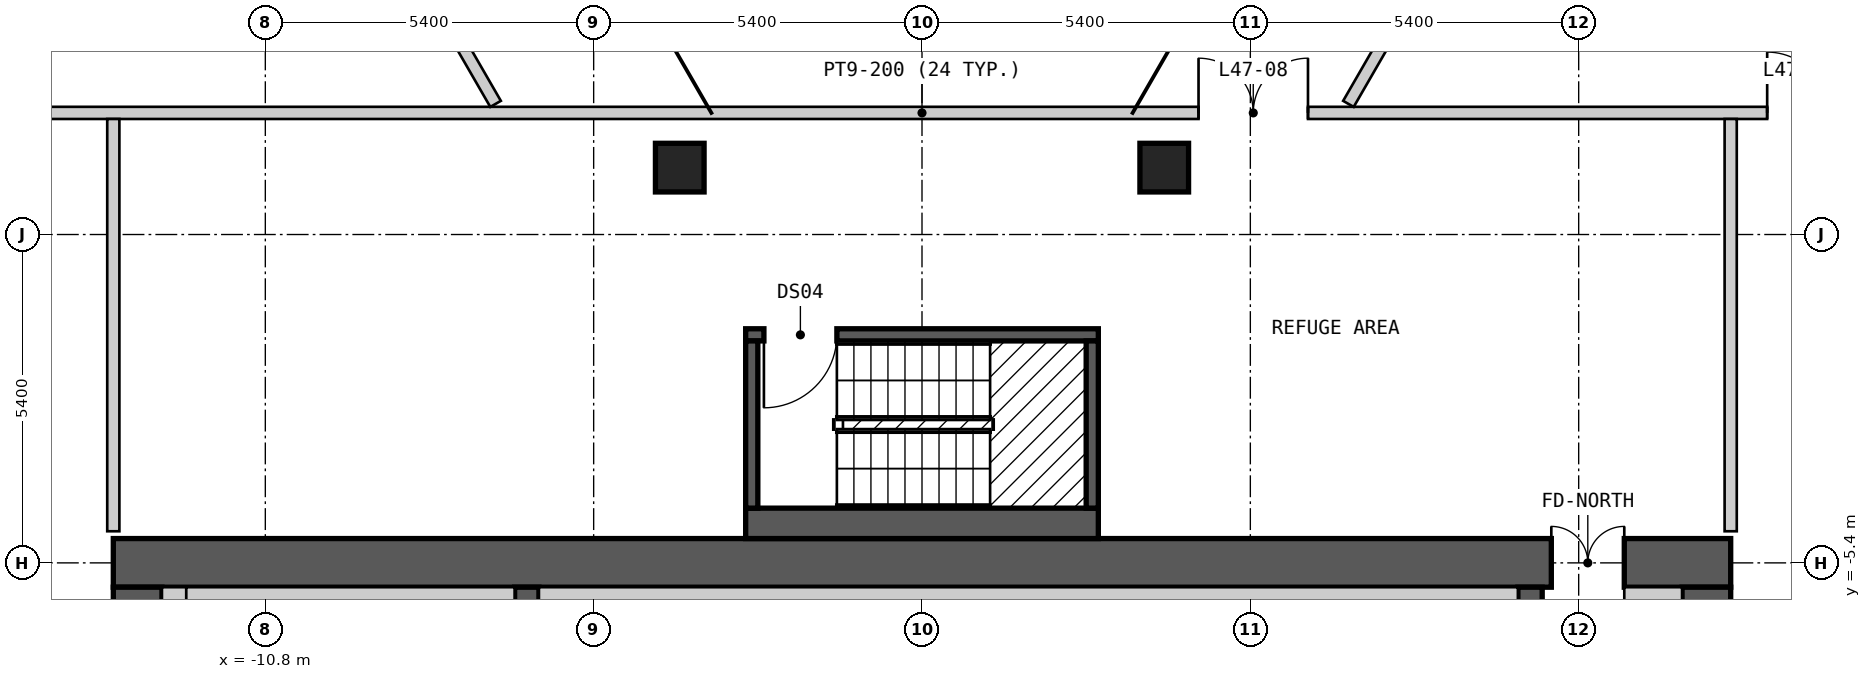
"""IFC4 building model, lengths in metres.
Left out: names, types, materials, properties, quantities, classifications, styles, units other than length and angle.
Written with IfcOpenShell. Run it as: python <this file> out.ifc"""

import sys

from ifc_helpers import new_model, si_unit, direction, frame, frame_2d, origin, origin_2d, place, context, subcontext, project, spatial, rectangle, extrude, element, fill, save


model = new_model("IFC4")
c1 = context("Model", 3, precision=1e-05, world=origin(), true_north=direction((0.0, 1.0)))
c2 = subcontext(c1, "Body", "Model", "MODEL_VIEW")
j1 = project(units=[si_unit("LENGTHUNIT", "METRE"), si_unit("PLANEANGLEUNIT", "RADIAN")], contexts=[c1])
p1 = place(None, origin())
s1 = spatial("IfcSite", under=j1, at=p1, CompositionType="ELEMENT")
p2 = place(p1, origin())
s2 = spatial("IfcBuilding", under=s1, at=p2, CompositionType="ELEMENT")
p3 = place(p2, frame((0.0, 0.0, 153.6)))
s3 = spatial("IfcBuildingStorey", under=s2, at=p3, CompositionType="ELEMENT", Elevation=153.6)
for number, where, z_axis, x_axis in (
    (1, (3.984, 1.1, 0.0), (0.0, 0.0, 1.0), (1.0, 0.0, 0.0)),
    (2, (-3.984, 1.1, 0.0), (0.0, 0.0, 1.0), (1.0, 0.0, 0.0)),
):
    element("IfcColumn", number, at=place(p3, frame(where, z_axis=z_axis, x_axis=x_axis)), inside=s3, PredefinedType="COLUMN", context=c2, shape_type="SweptSolid", body=[
        extrude(rectangle(XDim=0.8, YDim=0.8, at=origin_2d()), origin(), (0.0, 0.0, 1.0), 3.6),
    ])
p4 = place(p3, frame((-13.3, -5.4, 0.0), z_axis=(0.0, 0.0, 1.0), x_axis=(1.0, 0.0, 0.0)))
e3 = element("IfcWall", 3, at=p4, inside=s3, PredefinedType="SHEAR", context=c2, shape_type="SweptSolid", body=[
    extrude(rectangle(XDim=26.6, YDim=0.8, at=frame_2d((13.3, 0.0))), origin(), (0.0, 0.0, 1.0), 2.6),
])
p5 = place(p4, frame((23.65, 0.0, 0.0)))
e4 = element("IfcOpeningElement", 4, at=p5, cuts=e3, PredefinedType="OPENING", context=c2, shape_type="SweptSolid", body=[
    extrude(rectangle(XDim=1.2, YDim=2.1, at=frame_2d((0.6, 1.05))), frame((0.0, 0.41, 0.0), z_axis=(0.0, -1.0, 0.0), x_axis=(1.0, 0.0, 0.0)), (0.0, 0.0, 1.0), 0.82),
])
p6 = place(p3, frame((-12.9, -18.2, 0.0), z_axis=(0.0, 0.0, 1.0), x_axis=(0.0, 1.0, 0.0)))
e5 = element("IfcWall", 5, at=p6, inside=s3, PredefinedType="SHEAR", context=c2, shape_type="SweptSolid", body=[
    extrude(rectangle(XDim=12.4, YDim=0.8, at=frame_2d((6.2, 0.0))), origin(), (0.0, 0.0, 1.0), 2.6),
])
p7 = place(p6, frame((4.0, 0.0, 0.0)))
e6 = element("IfcOpeningElement", 6, at=p7, cuts=e5, PredefinedType="OPENING", context=c2, shape_type="SweptSolid", body=[
    extrude(rectangle(XDim=1.2, YDim=2.1, at=frame_2d((0.6, 1.05))), frame((0.0, 0.41, 0.0), z_axis=(0.0, -1.0, 0.0), x_axis=(1.0, 0.0, 0.0)), (0.0, 0.0, 1.0), 0.82),
])
p8 = place(p3, frame((12.9, -18.2, 0.0), z_axis=(0.0, 0.0, 1.0), x_axis=(0.0, 1.0, 0.0)))
e7 = element("IfcWall", 7, at=p8, inside=s3, PredefinedType="SHEAR", context=c2, shape_type="SweptSolid", body=[
    extrude(rectangle(XDim=12.4, YDim=0.8, at=frame_2d((6.2, 0.0))), origin(), (0.0, 0.0, 1.0), 2.6),
])
for number, where, z_axis, x_axis in (
    (8, (-6.5, -9.15, 0.0), (0.0, 0.0, 1.0), (0.0, 1.0, 0.0)),
    (9, (10.0, -9.15, 0.0), (0.0, 0.0, 1.0), (0.0, 1.0, 0.0)),
):
    element("IfcWall", number, at=place(p3, frame(where, z_axis=z_axis, x_axis=x_axis)), inside=s3, PredefinedType="SHEAR", context=c2, shape_type="SweptSolid", body=[
        extrude(rectangle(XDim=3.35, YDim=0.4, at=frame_2d((1.675, 0.0))), origin(), (0.0, 0.0, 1.0), 2.6),
    ])
p9 = place(p3, frame((-2.9, -4.75, 0.0), z_axis=(0.0, 0.0, 1.0), x_axis=(1.0, 0.0, 0.0)))
e10 = element("IfcWall", 10, at=p9, inside=s3, PredefinedType="SOLIDWALL", context=c2, shape_type="SweptSolid", body=[
    extrude(rectangle(XDim=5.8, YDim=0.5, at=frame_2d((2.9, 0.0))), origin(), (0.0, 0.0, 1.0), 2.6),
])
p10 = place(p3, frame((-2.9, -1.65, 0.0), z_axis=(0.0, 0.0, 1.0), x_axis=(1.0, 0.0, 0.0)))
e11 = element("IfcWall", 11, at=p10, inside=s3, PredefinedType="SOLIDWALL", context=c2, shape_type="SweptSolid", body=[
    extrude(rectangle(XDim=5.8, YDim=0.2, at=frame_2d((2.9, 0.0))), origin(), (0.0, 0.0, 1.0), 2.6),
])
p11 = place(p10, frame((0.3, 0.0, 0.0)))
e12 = element("IfcOpeningElement", 12, at=p11, cuts=e11, PredefinedType="OPENING", context=c2, shape_type="SweptSolid", body=[
    extrude(rectangle(XDim=1.2, YDim=2.1, at=frame_2d((0.6, 1.05))), frame((0.0, 0.11, 0.0), z_axis=(0.0, -1.0, 0.0), x_axis=(1.0, 0.0, 0.0)), (0.0, 0.0, 1.0), 0.22),
])
for number, where, z_axis, x_axis in (
    (13, (-2.8, -4.5, 0.0), (0.0, 0.0, 1.0), (0.0, 1.0, 0.0)),
    (14, (2.8, -4.5, 0.0), (0.0, 0.0, 1.0), (0.0, 1.0, 0.0)),
):
    element("IfcWall", number, at=place(p3, frame(where, z_axis=z_axis, x_axis=x_axis)), inside=s3, PredefinedType="SOLIDWALL", context=c2, shape_type="SweptSolid", body=[
        extrude(rectangle(XDim=2.75, YDim=0.2, at=frame_2d((1.375, 0.0))), origin(), (0.0, 0.0, 1.0), 2.6),
    ])
p12 = place(p3, frame((-24.253, 2.0, 0.0), z_axis=(0.0, 0.0, 1.0), x_axis=(1.0, 0.0, 0.0)))
e15 = element("IfcWall", 15, at=p12, inside=s3, PredefinedType="SOLIDWALL", context=c2, shape_type="SweptSolid", body=[
    extrude(rectangle(XDim=48.506, YDim=0.2, at=frame_2d((24.253, 0.0))), origin(), (0.0, 0.0, 1.0), 2.6),
])
p13 = place(p12, frame((38.153, 0.0, 0.0)))
e16 = element("IfcOpeningElement", 16, at=p13, cuts=e15, PredefinedType="OPENING", context=c2, shape_type="SweptSolid", body=[
    extrude(rectangle(XDim=1.0, YDim=2.1, at=frame_2d((0.5, 1.05))), frame((0.0, 0.11, 0.0), z_axis=(0.0, -1.0, 0.0), x_axis=(1.0, 0.0, 0.0)), (0.0, 0.0, 1.0), 0.22),
])
p14 = place(p12, frame((28.801, 0.0, 0.0)))
e17 = element("IfcOpeningElement", 17, at=p14, cuts=e15, PredefinedType="OPENING", context=c2, shape_type="SweptSolid", body=[
    extrude(rectangle(XDim=1.8, YDim=2.1, at=frame_2d((0.9, 1.05))), frame((0.0, 0.11, 0.0), z_axis=(0.0, -1.0, 0.0), x_axis=(1.0, 0.0, 0.0)), (0.0, 0.0, 1.0), 0.22),
])
for number, where, z_axis, x_axis in (
    (18, (-13.3, -4.88, 0.0), (0.0, 0.0, 1.0), (0.0, 1.0, 0.0)),
    (19, (13.3, -4.88, 0.0), (0.0, 0.0, 1.0), (0.0, 1.0, 0.0)),
):
    element("IfcWall", number, at=place(p3, frame(where, z_axis=z_axis, x_axis=x_axis)), inside=s3, PredefinedType="PARTITIONING", context=c2, shape_type="SweptSolid", body=[
        extrude(rectangle(XDim=6.78, YDim=0.2, at=frame_2d((3.39, 0.0))), origin(), (0.0, 0.0, 1.0), 2.6),
    ])
p15 = place(p3, frame((-10.392, 8.0, 0.0), z_axis=(0.0, 0.0, 1.0), x_axis=(0.500051862572, -0.865995458844, 0.0)))
e20 = element("IfcWall", 20, at=p15, inside=s3, PredefinedType="SOLIDWALL", context=c2, shape_type="SweptSolid", body=[
    extrude(rectangle(XDim=6.758, YDim=0.2, at=frame_2d((3.379, 0.0))), origin(), (0.0, 0.0, 1.0), 2.6),
])
p16 = place(p3, frame((7.013, 2.148, 0.0), z_axis=(0.0, 0.0, 1.0), x_axis=(0.499983511822, 0.866034923029, 0.0)))
e21 = element("IfcWall", 21, at=p16, inside=s3, PredefinedType="SOLIDWALL", context=c2, shape_type="SweptSolid", body=[
    extrude(rectangle(XDim=6.584, YDim=0.2, at=frame_2d((3.292, 0.0))), origin(), (0.0, 0.0, 1.0), 2.6),
])
p17 = place(p3, frame((-24.566, 2.15, 0.0), z_axis=(0.0, 0.0, 1.0), x_axis=(0.499985443393, 0.866033807882, 0.0)))
e22 = element("IfcWall", 22, at=p17, inside=s3, PredefinedType="SOLIDWALL", context=c2, shape_type="SweptSolid", body=[
    extrude(rectangle(XDim=20.732, YDim=0.2, at=frame_2d((10.366, 0.0))), origin(), (0.0, 0.0, 1.0), 2.6),
])
p18 = place(p3, frame((-12.3, -9.15, 0.0), z_axis=(0.0, 0.0, 1.0), x_axis=(0.0, 1.0, 0.0)))
e23 = element("IfcWall", 23, at=p18, inside=s3, PredefinedType="SOLIDWALL", context=c2, shape_type="SweptSolid", body=[
    extrude(rectangle(XDim=3.35, YDim=0.4, at=frame_2d((1.675, 0.0))), origin(), (0.0, 0.0, 1.0), 2.6),
])
p19 = place(p3, frame((-12.1, -6.0, 0.0), z_axis=(0.0, 0.0, 1.0), x_axis=(1.0, 0.0, 0.0)))
e24 = element("IfcWall", 24, at=p19, inside=s3, PredefinedType="SOLIDWALL", context=c2, shape_type="SweptSolid", body=[
    extrude(rectangle(XDim=5.4, YDim=0.4, at=frame_2d((2.7, 0.0))), origin(), (0.0, 0.0, 1.0), 2.6),
])
p20 = place(p3, frame((-6.3, -6.0, 0.0), z_axis=(0.0, 0.0, 1.0), x_axis=(1.0, 0.0, 0.0)))
e25 = element("IfcWall", 25, at=p20, inside=s3, PredefinedType="SOLIDWALL", context=c2, shape_type="SweptSolid", body=[
    extrude(rectangle(XDim=16.1, YDim=0.4, at=frame_2d((8.05, 0.0))), origin(), (0.0, 0.0, 1.0), 2.6),
])
p21 = place(p3, frame((11.55, -6.0, 0.0), z_axis=(0.0, 0.0, 1.0), x_axis=(1.0, 0.0, 0.0)))
e26 = element("IfcWall", 26, at=p21, inside=s3, PredefinedType="PARTITIONING", context=c2, shape_type="SweptSolid", body=[
    extrude(rectangle(XDim=0.95, YDim=0.4, at=frame_2d((0.475, 0.0))), origin(), (0.0, 0.0, 1.0), 2.6),
])
p22 = place(p11, origin())
e27 = element("IfcDoor", 27, at=p22, inside=s3, OperationType="SINGLE_SWING_LEFT", PredefinedType="DOOR", context=c2, shape_type="SweptSolid", body=[
    extrude(rectangle(XDim=1.2, YDim=2.1, at=frame_2d((0.6, 1.05))), frame((0.0, 0.025, 0.0), z_axis=(0.0, -1.0, 0.0), x_axis=(1.0, 0.0, 0.0)), (0.0, 0.0, 1.0), 0.05),
])
fill(e12, e27)
p23 = place(p13, origin())
e28 = element("IfcDoor", 28, at=p23, inside=s3, OperationType="SINGLE_SWING_LEFT", PredefinedType="DOOR", context=c2, shape_type="SweptSolid", body=[
    extrude(rectangle(XDim=1.0, YDim=2.1, at=frame_2d((0.5, 1.05))), frame((0.0, 0.025, 0.0), z_axis=(0.0, -1.0, 0.0), x_axis=(1.0, 0.0, 0.0)), (0.0, 0.0, 1.0), 0.05),
])
fill(e16, e28)
p24 = place(p14, origin())
e29 = element("IfcDoor", 29, at=p24, inside=s3, OperationType="DOUBLE_DOOR_SINGLE_SWING", PredefinedType="DOOR", context=c2, shape_type="SweptSolid", body=[
    extrude(rectangle(XDim=1.8, YDim=2.1, at=frame_2d((0.9, 1.05))), frame((0.0, 0.025, 0.0), z_axis=(0.0, -1.0, 0.0), x_axis=(1.0, 0.0, 0.0)), (0.0, 0.0, 1.0), 0.05),
])
fill(e17, e29)
p25 = place(p5, origin())
e30 = element("IfcDoor", 30, at=p25, inside=s3, OperationType="DOUBLE_DOOR_SINGLE_SWING", PredefinedType="DOOR", context=c2, shape_type="SweptSolid", body=[
    extrude(rectangle(XDim=1.2, YDim=2.1, at=frame_2d((0.6, 1.05))), frame((0.0, 0.025, 0.0), z_axis=(0.0, -1.0, 0.0), x_axis=(1.0, 0.0, 0.0)), (0.0, 0.0, 1.0), 0.05),
])
fill(e4, e30)
save(model, sys.argv[1])
